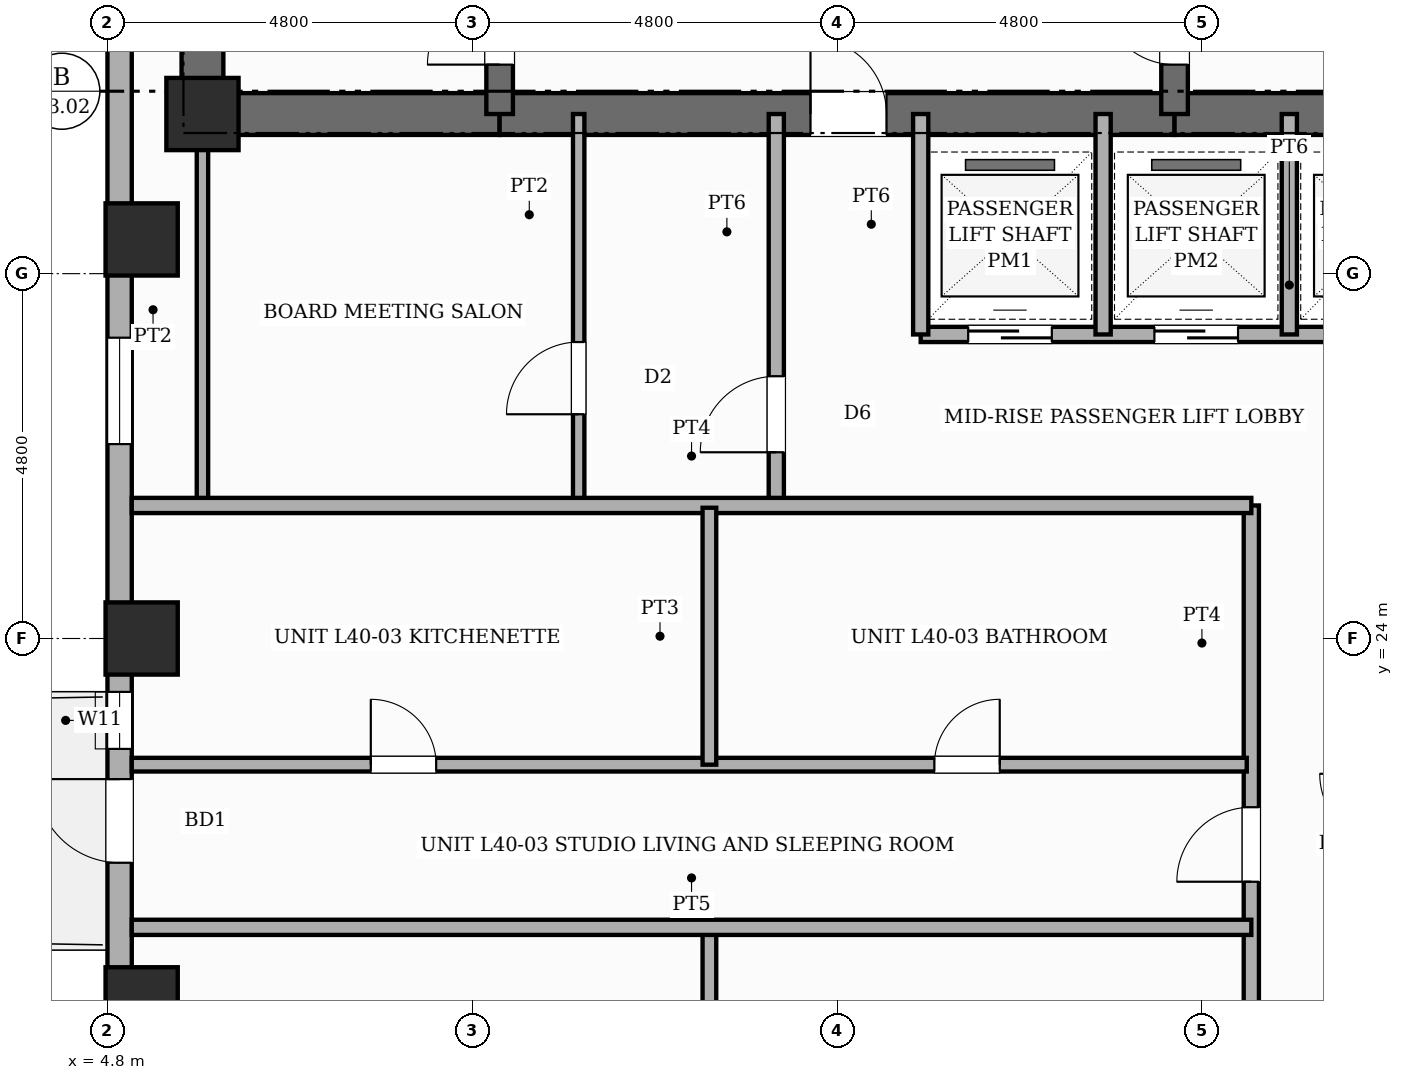
"""IFC4 building model, lengths in metres.
Left out: names, types, materials, properties, quantities, classifications, styles, units other than length and angle.
Written with IfcOpenShell. Run it as: python <this file> out.ifc"""

import sys

from ifc_helpers import new_model, si_unit, direction, frame, frame_2d, origin, origin_2d, place, context, subcontext, project, spatial, rectangle, extrude, element, fill, save


model = new_model("IFC4")
c1 = context("Model", 3, precision=1e-05, world=origin(), true_north=direction((0.0, 1.0)))
c2 = subcontext(c1, "Body", "Model", "MODEL_VIEW")
j1 = project(units=[si_unit("LENGTHUNIT", "METRE"), si_unit("PLANEANGLEUNIT", "RADIAN")], contexts=[c1])
p1 = place(None, origin())
s1 = spatial("IfcSite", under=j1, at=p1, CompositionType="ELEMENT")
p2 = place(p1, origin())
s2 = spatial("IfcBuilding", under=s1, at=p2, CompositionType="ELEMENT")
p3 = place(p2, frame((0.0, 0.0, 154.0)))
s3 = spatial("IfcBuildingStorey", under=s2, at=p3, CompositionType="ELEMENT", Elevation=154.0)
p4 = place(p3, frame((6.05, 30.625, 0.0), z_axis=(0.0, 0.0, 1.0), x_axis=(0.0, 1.0, 0.0)))
e1 = element("IfcWall", 1, at=p4, inside=s3, PredefinedType="SHEAR", context=c2, shape_type="SweptSolid", body=[
    extrude(rectangle(XDim=15.45, YDim=0.55, at=frame_2d((7.725, 0.0))), origin(), (0.0, 0.0, 1.0), 3.6),
])
p5 = place(p4, frame((10.725, 0.0, 0.0)))
e2 = element("IfcOpeningElement", 2, at=p5, cuts=e1, PredefinedType="OPENING", context=c2, shape_type="SweptSolid", body=[
    extrude(rectangle(XDim=0.95, YDim=2.15, at=frame_2d((0.475, 1.075))), frame((0.0, 0.285, 0.0), z_axis=(0.0, -1.0, 0.0), x_axis=(1.0, 0.0, 0.0)), (0.0, 0.0, 1.0), 0.57),
])
p6 = place(p3, frame((6.05, 30.9, 0.0), z_axis=(0.0, 0.0, 1.0), x_axis=(1.0, 0.0, 0.0)))
e3 = element("IfcWall", 3, at=p6, inside=s3, PredefinedType="SHEAR", context=c2, shape_type="SweptSolid", body=[
    extrude(rectangle(XDim=3.91, YDim=0.55, at=frame_2d((1.955, 0.0))), origin(), (0.0, 0.0, 1.0), 3.6),
])
p7 = place(p3, frame((9.96, 30.9, 0.0), z_axis=(0.0, 0.0, 1.0), x_axis=(1.0, 0.0, 0.0)))
e4 = element("IfcWall", 4, at=p7, inside=s3, PredefinedType="SHEAR", context=c2, shape_type="SweptSolid", body=[
    extrude(rectangle(XDim=8.88, YDim=0.55, at=frame_2d((4.44, 0.0))), origin(), (0.0, 0.0, 1.0), 3.6),
])
p8 = place(p7, frame((4.09, 0.0, 0.0)))
e5 = element("IfcOpeningElement", 5, at=p8, cuts=e4, PredefinedType="OPENING", context=c2, shape_type="SweptSolid", body=[
    extrude(rectangle(XDim=1.0, YDim=2.15, at=frame_2d((0.5, 1.075))), frame((0.0, 0.285, 0.0), z_axis=(0.0, -1.0, 0.0), x_axis=(1.0, 0.0, 0.0)), (0.0, 0.0, 1.0), 0.57),
])
p9 = place(p3, frame((18.84, 30.9, 0.0), z_axis=(0.0, 0.0, 1.0), x_axis=(1.0, 0.0, 0.0)))
e6 = element("IfcWall", 6, at=p9, inside=s3, PredefinedType="SHEAR", context=c2, shape_type="SweptSolid", body=[
    extrude(rectangle(XDim=3.91, YDim=0.55, at=frame_2d((1.955, 0.0))), origin(), (0.0, 0.0, 1.0), 3.6),
])
p10 = place(p3, frame((9.96, 30.9, 0.0), z_axis=(0.0, 0.0, 1.0), x_axis=(0.0, 1.0, 0.0)))
e7 = element("IfcWall", 7, at=p10, inside=s3, PredefinedType="SHEAR", context=c2, shape_type="SweptSolid", body=[
    extrude(rectangle(XDim=14.9, YDim=0.35, at=frame_2d((7.45, 0.0))), origin(), (0.0, 0.0, 1.0), 3.6),
])
p11 = place(p10, frame((0.65, 0.0, 0.0)))
e8 = element("IfcOpeningElement", 8, at=p11, cuts=e7, PredefinedType="OPENING", context=c2, shape_type="SweptSolid", body=[
    extrude(rectangle(XDim=0.95, YDim=2.1, at=frame_2d((0.475, 1.05))), frame((0.0, 0.185, 0.0), z_axis=(0.0, -1.0, 0.0), x_axis=(1.0, 0.0, 0.0)), (0.0, 0.0, 1.0), 0.37),
])
p12 = place(p10, frame((10.45, 0.0, 0.0)))
e9 = element("IfcOpeningElement", 9, at=p12, cuts=e7, PredefinedType="OPENING", context=c2, shape_type="SweptSolid", body=[
    extrude(rectangle(XDim=1.0, YDim=2.15, at=frame_2d((0.5, 1.075))), frame((0.0, 0.185, 0.0), z_axis=(0.0, -1.0, 0.0), x_axis=(1.0, 0.0, 0.0)), (0.0, 0.0, 1.0), 0.37),
])
p13 = place(p3, frame((18.84, 30.9, 0.0), z_axis=(0.0, 0.0, 1.0), x_axis=(0.0, 1.0, 0.0)))
e10 = element("IfcWall", 10, at=p13, inside=s3, PredefinedType="SHEAR", context=c2, shape_type="SweptSolid", body=[
    extrude(rectangle(XDim=14.9, YDim=0.35, at=frame_2d((7.45, 0.0))), origin(), (0.0, 0.0, 1.0), 3.6),
])
p14 = place(p13, frame((0.65, 0.0, 0.0)))
e11 = element("IfcOpeningElement", 11, at=p14, cuts=e10, PredefinedType="OPENING", context=c2, shape_type="SweptSolid", body=[
    extrude(rectangle(XDim=0.95, YDim=2.1, at=frame_2d((0.475, 1.05))), frame((0.0, 0.185, 0.0), z_axis=(0.0, -1.0, 0.0), x_axis=(1.0, 0.0, 0.0)), (0.0, 0.0, 1.0), 0.37),
])
p15 = place(p13, frame((10.45, 0.0, 0.0)))
e12 = element("IfcOpeningElement", 12, at=p15, cuts=e10, PredefinedType="OPENING", context=c2, shape_type="SweptSolid", body=[
    extrude(rectangle(XDim=1.0, YDim=2.15, at=frame_2d((0.5, 1.075))), frame((0.0, 0.185, 0.0), z_axis=(0.0, -1.0, 0.0), x_axis=(1.0, 0.0, 0.0)), (0.0, 0.0, 1.0), 0.37),
])
for number, where, z_axis, x_axis in (
    (13, (5.25, 19.2, 0.0), (0.0, 0.0, 1.0), (1.0, 0.0, 0.0)),
    (14, (5.25, 24.0, 0.0), (0.0, 0.0, 1.0), (1.0, 0.0, 0.0)),
    (15, (5.25, 29.25, 0.0), (0.0, 0.0, 1.0), (1.0, 0.0, 0.0)),
    (16, (6.05, 30.9, 0.0), (0.0, 0.0, 1.0), (1.0, 0.0, 0.0)),
):
    element("IfcColumn", number, at=place(p3, frame(where, z_axis=z_axis, x_axis=x_axis)), inside=s3, PredefinedType="COLUMN", context=c2, shape_type="SweptSolid", body=[
        extrude(rectangle(XDim=0.95, YDim=0.95, at=origin_2d()), origin(), (0.0, 0.0, 1.0), 3.6),
    ])
p16 = place(p3, frame((4.96, 12.0, 0.0), z_axis=(0.0, 0.0, 1.0), x_axis=(0.0, 1.0, 0.0)))
e17 = element("IfcWall", 17, at=p16, inside=s3, PredefinedType="STANDARD", context=c2, shape_type="SweptSolid", body=[
    extrude(rectangle(XDim=33.6, YDim=0.32, at=frame_2d((16.8, 0.0))), origin(), (0.0, 0.0, 1.0), 2.54),
])
p17 = place(p16, frame((9.05, 0.0, 0.0)))
e18 = element("IfcOpeningElement", 18, at=p17, cuts=e17, PredefinedType="OPENING", context=c2, shape_type="SweptSolid", body=[
    extrude(rectangle(XDim=1.1, YDim=2.15, at=frame_2d((0.55, 1.075))), frame((0.0, 0.17, 0.0), z_axis=(0.0, -1.0, 0.0), x_axis=(1.0, 0.0, 0.0)), (0.0, 0.0, 1.0), 0.34),
])
p18 = place(p16, frame((3.335, 0.0, 0.65)))
e19 = element("IfcOpeningElement", 19, at=p18, cuts=e17, PredefinedType="OPENING", context=c2, shape_type="SweptSolid", body=[
    extrude(rectangle(XDim=1.4, YDim=1.1, at=frame_2d((0.7, 0.55))), frame((0.0, 0.17, 0.0), z_axis=(0.0, -1.0, 0.0), x_axis=(1.0, 0.0, 0.0)), (0.0, 0.0, 1.0), 0.34),
])
p19 = place(p16, frame((0.683, 0.0, 0.45)))
e20 = element("IfcOpeningElement", 20, at=p19, cuts=e17, PredefinedType="OPENING", context=c2, shape_type="SweptSolid", body=[
    extrude(rectangle(XDim=0.95, YDim=1.8, at=frame_2d((0.475, 0.9))), frame((0.0, 0.17, 0.0), z_axis=(0.0, -1.0, 0.0), x_axis=(1.0, 0.0, 0.0)), (0.0, 0.0, 1.0), 0.34),
])
p20 = place(p16, frame((5.466, 0.0, 0.45)))
e21 = element("IfcOpeningElement", 21, at=p20, cuts=e17, PredefinedType="OPENING", context=c2, shape_type="SweptSolid", body=[
    extrude(rectangle(XDim=0.95, YDim=1.8, at=frame_2d((0.475, 0.9))), frame((0.0, 0.17, 0.0), z_axis=(0.0, -1.0, 0.0), x_axis=(1.0, 0.0, 0.0)), (0.0, 0.0, 1.0), 0.34),
])
p21 = place(p16, frame((10.548, 0.0, 0.45)))
e22 = element("IfcOpeningElement", 22, at=p21, cuts=e17, PredefinedType="OPENING", context=c2, shape_type="SweptSolid", body=[
    extrude(rectangle(XDim=0.75, YDim=1.8, at=frame_2d((0.375, 0.9))), frame((0.0, 0.17, 0.0), z_axis=(0.0, -1.0, 0.0), x_axis=(1.0, 0.0, 0.0)), (0.0, 0.0, 1.0), 0.34),
])
p22 = place(p16, frame((14.558, 0.0, 0.65)))
e23 = element("IfcOpeningElement", 23, at=p22, cuts=e17, PredefinedType="OPENING", context=c2, shape_type="SweptSolid", body=[
    extrude(rectangle(XDim=1.4, YDim=1.1, at=frame_2d((0.7, 0.55))), frame((0.0, 0.17, 0.0), z_axis=(0.0, -1.0, 0.0), x_axis=(1.0, 0.0, 0.0)), (0.0, 0.0, 1.0), 0.34),
])
p23 = place(p3, frame((13.6, 25.75, 0.0), z_axis=(0.0, 0.0, 1.0), x_axis=(0.0, 1.0, 0.0)))
e24 = element("IfcWall", 24, at=p23, inside=s3, PredefinedType="POLYGONAL", context=c2, shape_type="SweptSolid", body=[
    extrude(rectangle(XDim=5.15, YDim=0.2, at=frame_2d((2.575, 0.0))), origin(), (0.0, 0.0, 1.0), 3.36),
])
p24 = place(p23, frame((0.7, 0.0, 0.0)))
e25 = element("IfcOpeningElement", 25, at=p24, cuts=e24, PredefinedType="OPENING", context=c2, shape_type="SweptSolid", body=[
    extrude(rectangle(XDim=1.0, YDim=2.15, at=frame_2d((0.5, 1.075))), frame((0.0, 0.11, 0.0), z_axis=(0.0, -1.0, 0.0), x_axis=(1.0, 0.0, 0.0)), (0.0, 0.0, 1.0), 0.22),
])
p25 = place(p3, frame((6.05, 25.75, 0.0), z_axis=(0.0, 0.0, 1.0), x_axis=(0.0, 1.0, 0.0)))
e26 = element("IfcWall", 26, at=p25, inside=s3, PredefinedType="PARTITIONING", context=c2, shape_type="SweptSolid", body=[
    extrude(rectangle(XDim=5.15, YDim=0.15, at=frame_2d((2.575, 0.0))), origin(), (0.0, 0.0, 1.0), 3.36),
])
p26 = place(p3, frame((11.0, 25.75, 0.0), z_axis=(0.0, 0.0, 1.0), x_axis=(0.0, 1.0, 0.0)))
e27 = element("IfcWall", 27, at=p26, inside=s3, PredefinedType="PARTITIONING", context=c2, shape_type="SweptSolid", body=[
    extrude(rectangle(XDim=5.15, YDim=0.15, at=frame_2d((2.575, 0.0))), origin(), (0.0, 0.0, 1.0), 3.36),
])
p27 = place(p26, frame((1.2, 0.0, 0.0)))
e28 = element("IfcOpeningElement", 28, at=p27, cuts=e27, PredefinedType="OPENING", context=c2, shape_type="SweptSolid", body=[
    extrude(rectangle(XDim=0.95, YDim=2.15, at=frame_2d((0.475, 1.075))), frame((0.0, 0.085, 0.0), z_axis=(0.0, -1.0, 0.0), x_axis=(1.0, 0.0, 0.0)), (0.0, 0.0, 1.0), 0.17),
])
p28 = place(p3, frame((15.5, 28.0, 0.0), z_axis=(0.0, 0.0, 1.0), x_axis=(1.0, 0.0, 0.0)))
e29 = element("IfcWall", 29, at=p28, inside=s3, PredefinedType="POLYGONAL", context=c2, shape_type="SweptSolid", body=[
    extrude(rectangle(XDim=7.25, YDim=0.2, at=frame_2d((3.625, 0.0))), origin(), (0.0, 0.0, 1.0), 3.36),
])
p29 = place(p28, frame((0.625, 0.0, 0.0)))
e30 = element("IfcOpeningElement", 30, at=p29, cuts=e29, PredefinedType="OPENING", context=c2, shape_type="SweptSolid", body=[
    extrude(rectangle(XDim=1.1, YDim=2.15, at=frame_2d((0.55, 1.075))), frame((0.0, 0.11, 0.0), z_axis=(0.0, -1.0, 0.0), x_axis=(1.0, 0.0, 0.0)), (0.0, 0.0, 1.0), 0.22),
])
p30 = place(p28, frame((3.075, 0.0, 0.0)))
e31 = element("IfcOpeningElement", 31, at=p30, cuts=e29, PredefinedType="OPENING", context=c2, shape_type="SweptSolid", body=[
    extrude(rectangle(XDim=1.1, YDim=2.15, at=frame_2d((0.55, 1.075))), frame((0.0, 0.11, 0.0), z_axis=(0.0, -1.0, 0.0), x_axis=(1.0, 0.0, 0.0)), (0.0, 0.0, 1.0), 0.22),
])
p31 = place(p28, frame((5.525, 0.0, 0.0)))
e32 = element("IfcOpeningElement", 32, at=p31, cuts=e29, PredefinedType="OPENING", context=c2, shape_type="SweptSolid", body=[
    extrude(rectangle(XDim=1.1, YDim=2.15, at=frame_2d((0.55, 1.075))), frame((0.0, 0.11, 0.0), z_axis=(0.0, -1.0, 0.0), x_axis=(1.0, 0.0, 0.0)), (0.0, 0.0, 1.0), 0.22),
])
for number, where, z_axis, x_axis in (
    (33, (15.5, 28.0, 0.0), (0.0, 0.0, 1.0), (0.0, 1.0, 0.0)),
    (34, (17.9, 28.0, 0.0), (0.0, 0.0, 1.0), (0.0, 1.0, 0.0)),
    (35, (20.35, 28.0, 0.0), (0.0, 0.0, 1.0), (0.0, 1.0, 0.0)),
):
    element("IfcWall", number, at=place(p3, frame(where, z_axis=z_axis, x_axis=x_axis)), inside=s3, PredefinedType="POLYGONAL", context=c2, shape_type="SweptSolid", body=[
        extrude(rectangle(XDim=2.9, YDim=0.2, at=frame_2d((1.45, 0.0))), origin(), (0.0, 0.0, 1.0), 3.36),
    ])
p32 = place(p3, frame((19.85, 9.92, 0.0), z_axis=(0.0, 0.0, 1.0), x_axis=(0.0, 1.0, 0.0)))
e36 = element("IfcWall", 36, at=p32, inside=s3, PredefinedType="PARTITIONING", context=c2, shape_type="SweptSolid", body=[
    extrude(rectangle(XDim=15.83, YDim=0.2, at=frame_2d((7.915, 0.0))), origin(), (0.0, 0.0, 1.0), 3.36),
])
p33 = place(p32, frame((0.885, 0.0, 0.0)))
e37 = element("IfcOpeningElement", 37, at=p33, cuts=e36, PredefinedType="OPENING", context=c2, shape_type="SweptSolid", body=[
    extrude(rectangle(XDim=0.98, YDim=2.18, at=frame_2d((0.49, 1.09))), frame((0.0, 0.11, 0.0), z_axis=(0.0, -1.0, 0.0), x_axis=(1.0, 0.0, 0.0)), (0.0, 0.0, 1.0), 0.22),
])
p34 = place(p32, frame((5.598, 0.0, 0.0)))
e38 = element("IfcOpeningElement", 38, at=p34, cuts=e36, PredefinedType="OPENING", context=c2, shape_type="SweptSolid", body=[
    extrude(rectangle(XDim=0.98, YDim=2.18, at=frame_2d((0.49, 1.09))), frame((0.0, 0.11, 0.0), z_axis=(0.0, -1.0, 0.0), x_axis=(1.0, 0.0, 0.0)), (0.0, 0.0, 1.0), 0.22),
])
p35 = place(p32, frame((10.88, 0.0, 0.0)))
e39 = element("IfcOpeningElement", 39, at=p35, cuts=e36, PredefinedType="OPENING", context=c2, shape_type="SweptSolid", body=[
    extrude(rectangle(XDim=0.98, YDim=2.18, at=frame_2d((0.49, 1.09))), frame((0.0, 0.11, 0.0), z_axis=(0.0, -1.0, 0.0), x_axis=(1.0, 0.0, 0.0)), (0.0, 0.0, 1.0), 0.22),
])
p36 = place(p3, frame((5.12, 25.75, 0.0), z_axis=(0.0, 0.0, 1.0), x_axis=(1.0, 0.0, 0.0)))
e40 = element("IfcWall", 40, at=p36, inside=s3, PredefinedType="PARTITIONING", context=c2, shape_type="SweptSolid", body=[
    extrude(rectangle(XDim=14.73, YDim=0.2, at=frame_2d((7.365, 0.0))), origin(), (0.0, 0.0, 1.0), 3.36),
])
p37 = place(p3, frame((12.72, 17.176, 0.0), z_axis=(0.0, 0.0, 1.0), x_axis=(0.0, 1.0, 0.0)))
e41 = element("IfcWall", 41, at=p37, inside=s3, PredefinedType="PLUMBINGWALL", context=c2, shape_type="SweptSolid", body=[
    extrude(rectangle(XDim=3.064, YDim=0.18, at=frame_2d((1.532, 0.0))), origin(), (0.0, 0.0, 1.0), 3.36),
])
p38 = place(p3, frame((5.12, 20.2, 0.0), z_axis=(0.0, 0.0, 1.0), x_axis=(1.0, 0.0, 0.0)))
e42 = element("IfcWall", 42, at=p38, inside=s3, PredefinedType="SOLIDWALL", context=c2, shape_type="SweptSolid", body=[
    extrude(rectangle(XDim=14.73, YDim=0.2, at=frame_2d((7.365, 0.0))), origin(), (0.0, 0.0, 1.0), 3.36),
])
p39 = place(p3, frame((5.12, 22.34, 0.0), z_axis=(0.0, 0.0, 1.0), x_axis=(1.0, 0.0, 0.0)))
e43 = element("IfcWall", 43, at=p39, inside=s3, PredefinedType="PLUMBINGWALL", context=c2, shape_type="SweptSolid", body=[
    extrude(rectangle(XDim=14.67, YDim=0.18, at=frame_2d((7.335, 0.0))), origin(), (0.0, 0.0, 1.0), 3.36),
])
p40 = place(p39, frame((3.145, 0.0, 0.0)))
e44 = element("IfcOpeningElement", 44, at=p40, cuts=e43, PredefinedType="OPENING", context=c2, shape_type="SweptSolid", body=[
    extrude(rectangle(XDim=0.86, YDim=2.1, at=frame_2d((0.43, 1.05))), frame((0.0, 0.1, 0.0), z_axis=(0.0, -1.0, 0.0), x_axis=(1.0, 0.0, 0.0)), (0.0, 0.0, 1.0), 0.2),
])
p41 = place(p39, frame((10.56, 0.0, 0.0)))
e45 = element("IfcOpeningElement", 45, at=p41, cuts=e43, PredefinedType="OPENING", context=c2, shape_type="SweptSolid", body=[
    extrude(rectangle(XDim=0.86, YDim=2.1, at=frame_2d((0.43, 1.05))), frame((0.0, 0.1, 0.0), z_axis=(0.0, -1.0, 0.0), x_axis=(1.0, 0.0, 0.0)), (0.0, 0.0, 1.0), 0.2),
])
p42 = place(p3, frame((12.72, 22.34, 0.0), z_axis=(0.0, 0.0, 1.0), x_axis=(0.0, 1.0, 0.0)))
e46 = element("IfcWall", 46, at=p42, inside=s3, PredefinedType="PLUMBINGWALL", context=c2, shape_type="SweptSolid", body=[
    extrude(rectangle(XDim=3.38, YDim=0.18, at=frame_2d((1.69, 0.0))), origin(), (0.0, 0.0, 1.0), 3.36),
])
p43 = place(p17, origin())
e47 = element("IfcDoor", 47, at=p43, inside=s3, OperationType="SINGLE_SWING_RIGHT", PredefinedType="DOOR", context=c2, shape_type="SweptSolid", body=[
    extrude(rectangle(XDim=1.1, YDim=2.15, at=frame_2d((0.55, 1.075))), frame((0.0, 0.025, 0.0), z_axis=(0.0, -1.0, 0.0), x_axis=(1.0, 0.0, 0.0)), (0.0, 0.0, 1.0), 0.05),
])
fill(e18, e47)
p44 = place(p21, origin())
e48 = element("IfcWindow", 48, at=p44, inside=s3, PartitioningType="SINGLE_PANEL", PredefinedType="WINDOW", context=c2, shape_type="SweptSolid", body=[
    extrude(rectangle(XDim=0.75, YDim=1.8, at=frame_2d((0.375, 0.9))), frame((0.0, 0.03, 0.0), z_axis=(0.0, -1.0, 0.0), x_axis=(1.0, 0.0, 0.0)), (0.0, 0.0, 1.0), 0.06),
])
fill(e22, e48)
p45 = place(p22, origin())
e49 = element("IfcWindow", 49, at=p45, inside=s3, PartitioningType="SINGLE_PANEL", PredefinedType="WINDOW", context=c2, shape_type="SweptSolid", body=[
    extrude(rectangle(XDim=1.4, YDim=1.1, at=frame_2d((0.7, 0.55))), frame((0.0, 0.03, 0.0), z_axis=(0.0, -1.0, 0.0), x_axis=(1.0, 0.0, 0.0)), (0.0, 0.0, 1.0), 0.06),
])
fill(e23, e49)
p46 = place(p11, origin())
e50 = element("IfcDoor", 50, at=p46, inside=s3, OperationType="SINGLE_SWING_LEFT", PredefinedType="DOOR", context=c2, shape_type="SweptSolid", body=[
    extrude(rectangle(XDim=0.95, YDim=2.1, at=frame_2d((0.475, 1.05))), frame((0.0, 0.025, 0.0), z_axis=(0.0, -1.0, 0.0), x_axis=(1.0, 0.0, 0.0)), (0.0, 0.0, 1.0), 0.05),
])
fill(e8, e50)
p47 = place(p14, origin())
e51 = element("IfcDoor", 51, at=p47, inside=s3, OperationType="SINGLE_SWING_RIGHT", PredefinedType="DOOR", context=c2, shape_type="SweptSolid", body=[
    extrude(rectangle(XDim=0.95, YDim=2.1, at=frame_2d((0.475, 1.05))), frame((0.0, 0.025, 0.0), z_axis=(0.0, -1.0, 0.0), x_axis=(1.0, 0.0, 0.0)), (0.0, 0.0, 1.0), 0.05),
])
fill(e11, e51)
p48 = place(p8, origin())
e52 = element("IfcDoor", 52, at=p48, inside=s3, OperationType="SINGLE_SWING_LEFT", PredefinedType="DOOR", context=c2, shape_type="SweptSolid", body=[
    extrude(rectangle(XDim=1.0, YDim=2.15, at=frame_2d((0.5, 1.075))), frame((0.0, 0.025, 0.0), z_axis=(0.0, -1.0, 0.0), x_axis=(1.0, 0.0, 0.0)), (0.0, 0.0, 1.0), 0.05),
])
fill(e5, e52)
p49 = place(p24, origin())
e53 = element("IfcDoor", 53, at=p49, inside=s3, OperationType="SINGLE_SWING_LEFT", PredefinedType="DOOR", context=c2, shape_type="SweptSolid", body=[
    extrude(rectangle(XDim=1.0, YDim=2.15, at=frame_2d((0.5, 1.075))), frame((0.0, 0.025, 0.0), z_axis=(0.0, -1.0, 0.0), x_axis=(1.0, 0.0, 0.0)), (0.0, 0.0, 1.0), 0.05),
])
fill(e25, e53)
p50 = place(p27, origin())
e54 = element("IfcDoor", 54, at=p50, inside=s3, OperationType="SINGLE_SWING_LEFT", PredefinedType="DOOR", context=c2, shape_type="SweptSolid", body=[
    extrude(rectangle(XDim=0.95, YDim=2.15, at=frame_2d((0.475, 1.075))), frame((0.0, 0.025, 0.0), z_axis=(0.0, -1.0, 0.0), x_axis=(1.0, 0.0, 0.0)), (0.0, 0.0, 1.0), 0.05),
])
fill(e28, e54)
p51 = place(p29, origin())
e55 = element("IfcDoor", 55, at=p51, inside=s3, OperationType="SLIDING_TO_LEFT", PredefinedType="DOOR", context=c2, shape_type="SweptSolid", body=[
    extrude(rectangle(XDim=1.1, YDim=2.15, at=frame_2d((0.55, 1.075))), frame((0.0, 0.025, 0.0), z_axis=(0.0, -1.0, 0.0), x_axis=(1.0, 0.0, 0.0)), (0.0, 0.0, 1.0), 0.05),
])
fill(e30, e55)
p52 = place(p30, origin())
e56 = element("IfcDoor", 56, at=p52, inside=s3, OperationType="SLIDING_TO_RIGHT", PredefinedType="DOOR", context=c2, shape_type="SweptSolid", body=[
    extrude(rectangle(XDim=1.1, YDim=2.15, at=frame_2d((0.55, 1.075))), frame((0.0, 0.025, 0.0), z_axis=(0.0, -1.0, 0.0), x_axis=(1.0, 0.0, 0.0)), (0.0, 0.0, 1.0), 0.05),
])
fill(e31, e56)
p53 = place(p35, origin())
e57 = element("IfcDoor", 57, at=p53, inside=s3, OperationType="SINGLE_SWING_LEFT", PredefinedType="DOOR", context=c2, shape_type="SweptSolid", body=[
    extrude(rectangle(XDim=0.98, YDim=2.18, at=frame_2d((0.49, 1.09))), frame((0.0, 0.025, 0.0), z_axis=(0.0, -1.0, 0.0), x_axis=(1.0, 0.0, 0.0)), (0.0, 0.0, 1.0), 0.05),
])
fill(e39, e57)
p54 = place(p40, origin())
e58 = element("IfcDoor", 58, at=p54, inside=s3, OperationType="SINGLE_SWING_LEFT", PredefinedType="DOOR", context=c2, shape_type="SweptSolid", body=[
    extrude(rectangle(XDim=0.86, YDim=2.1, at=frame_2d((0.43, 1.05))), frame((0.0, 0.025, 0.0), z_axis=(0.0, -1.0, 0.0), x_axis=(1.0, 0.0, 0.0)), (0.0, 0.0, 1.0), 0.05),
])
fill(e44, e58)
p55 = place(p41, origin())
e59 = element("IfcDoor", 59, at=p55, inside=s3, OperationType="SINGLE_SWING_RIGHT", PredefinedType="DOOR", context=c2, shape_type="SweptSolid", body=[
    extrude(rectangle(XDim=0.86, YDim=2.1, at=frame_2d((0.43, 1.05))), frame((0.0, 0.025, 0.0), z_axis=(0.0, -1.0, 0.0), x_axis=(1.0, 0.0, 0.0)), (0.0, 0.0, 1.0), 0.05),
])
fill(e45, e59)
save(model, sys.argv[1])
